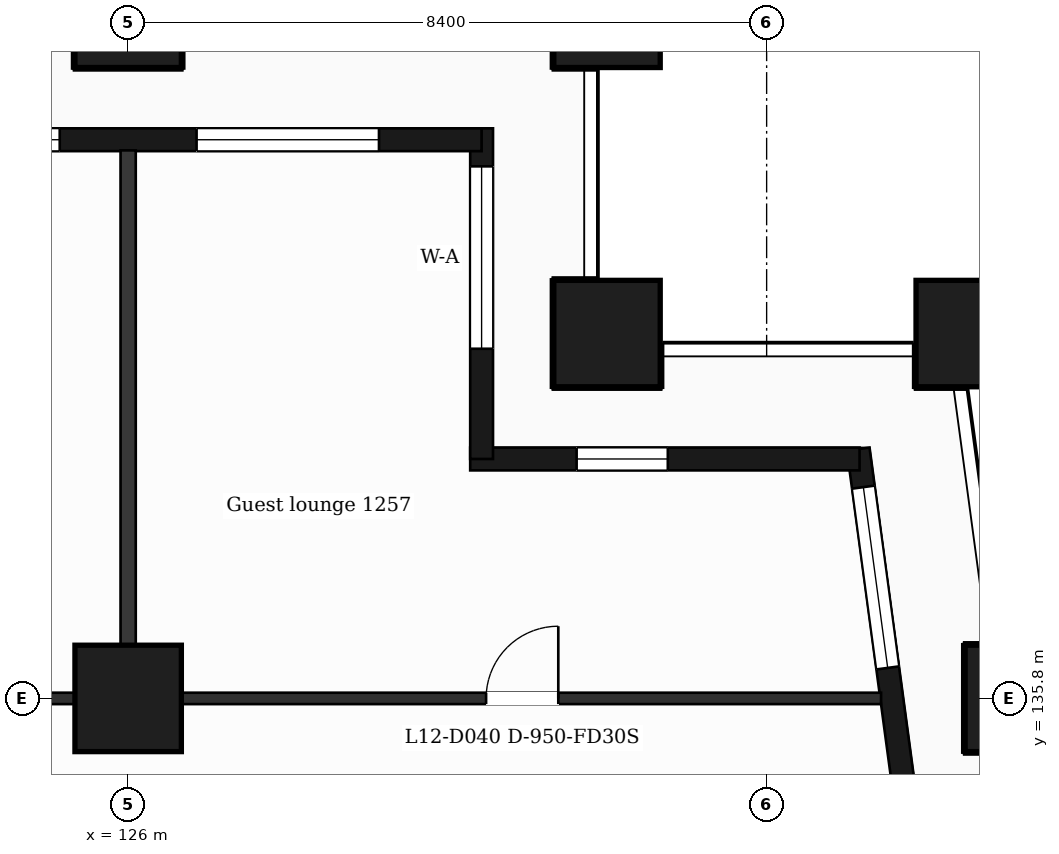
"""IFC4 building model, lengths in metres.
Left out: names, types, materials, properties, quantities, classifications, styles, units other than length and angle.
Written with IfcOpenShell. Run it as: python <this file> out.ifc"""

import sys

from ifc_helpers import new_model, si_unit, direction, frame, frame_2d, origin, origin_2d, place, context, subcontext, project, spatial, rectangle, extrude, element, fill, save


model = new_model("IFC4")
c1 = context("Model", 3, precision=1e-05, world=origin(), true_north=direction((0.0, 1.0)))
c2 = subcontext(c1, "Body", "Model", "MODEL_VIEW")
j1 = project(units=[si_unit("LENGTHUNIT", "METRE"), si_unit("PLANEANGLEUNIT", "RADIAN")], contexts=[c1])
p1 = place(None, origin())
s1 = spatial("IfcSite", under=j1, at=p1, CompositionType="ELEMENT")
p2 = place(p1, origin())
s2 = spatial("IfcBuilding", under=s1, at=p2, CompositionType="ELEMENT")
p3 = place(p2, frame((0.0, 0.0, 60.0)))
s3 = spatial("IfcBuildingStorey", under=s2, at=p3, CompositionType="ELEMENT", Elevation=60.0)
for number, where, z_axis, x_axis in (
    (1, (132.3, 140.6, 0.0), (0.0, 0.0, 1.0), (1.0, 0.0, 0.0)),
    (2, (137.065, 140.6, 0.0), (0.0, 0.0, 1.0), (1.0, 0.0, 0.0)),
    (3, (126.0, 135.8, 0.0), (0.0, 0.0, 1.0), (1.0, 0.0, 0.0)),
    (4, (137.711, 135.8, 0.0), (0.0, 0.0, 1.0), (1.0, 0.0, 0.0)),
    (5, (126.0, 144.8, 0.0), (0.0, 0.0, 1.0), (1.0, 0.0, 0.0)),
    (6, (132.3, 144.8, 0.0), (0.0, 0.0, 1.0), (1.0, 0.0, 0.0)),
):
    element("IfcColumn", number, at=place(p3, frame(where, z_axis=z_axis, x_axis=x_axis)), inside=s3, PredefinedType="COLUMN", context=c2, shape_type="SweptSolid", body=[
        extrude(rectangle(XDim=1.4, YDim=1.4, at=origin_2d()), origin(), (0.0, 0.0, 1.0), 3.5),
    ])
p4 = place(p3, frame((136.504, 132.4, 0.0), z_axis=(0.0, 0.0, 1.0), x_axis=(-0.133399697462, 0.99106231929, 0.0)))
e7 = element("IfcWall", 7, at=p4, inside=s3, PredefinedType="SOLIDWALL", context=c2, shape_type="SweptSolid", body=[
    extrude(rectangle(XDim=6.74, YDim=0.3, at=frame_2d((3.37, 0.0))), origin(), (0.0, 0.0, 1.0), 3.18),
])
p5 = place(p4, frame((1.115, 0.0, 0.0)))
e8 = element("IfcOpeningElement", 8, at=p5, cuts=e7, PredefinedType="OPENING", context=c2, shape_type="SweptSolid", body=[
    extrude(rectangle(XDim=1.2, YDim=2.4, at=frame_2d((0.6, 1.2))), frame((0.0, 0.16, 0.0), z_axis=(0.0, -1.0, 0.0), x_axis=(1.0, 0.0, 0.0)), (0.0, 0.0, 1.0), 0.32),
])
p6 = place(p4, frame((3.835, 0.0, 0.9)))
e9 = element("IfcOpeningElement", 9, at=p6, cuts=e7, PredefinedType="OPENING", context=c2, shape_type="SweptSolid", body=[
    extrude(rectangle(XDim=2.4, YDim=2.1, at=frame_2d((1.2, 1.05))), frame((0.0, 0.16, 0.0), z_axis=(0.0, -1.0, 0.0), x_axis=(1.0, 0.0, 0.0)), (0.0, 0.0, 1.0), 0.32),
])
p7 = place(p3, frame((135.623, 138.95, 0.0), z_axis=(0.0, 0.0, 1.0), x_axis=(-1.0, 0.0, 0.0)))
e10 = element("IfcWall", 10, at=p7, inside=s3, PredefinedType="SOLIDWALL", context=c2, shape_type="SweptSolid", body=[
    extrude(rectangle(XDim=5.123, YDim=0.3, at=frame_2d((2.561, 0.0))), origin(), (0.0, 0.0, 1.0), 3.18),
])
p8 = place(p7, frame((2.523, 0.0, 0.9)))
e11 = element("IfcOpeningElement", 11, at=p8, cuts=e10, PredefinedType="OPENING", context=c2, shape_type="SweptSolid", body=[
    extrude(rectangle(XDim=1.2, YDim=2.1, at=frame_2d((0.6, 1.05))), frame((0.0, 0.16, 0.0), z_axis=(0.0, -1.0, 0.0), x_axis=(1.0, 0.0, 0.0)), (0.0, 0.0, 1.0), 0.32),
])
p9 = place(p3, frame((130.65, 138.95, 0.0), z_axis=(0.0, 0.0, 1.0), x_axis=(0.0, 1.0, 0.0)))
e12 = element("IfcWall", 12, at=p9, inside=s3, PredefinedType="SOLIDWALL", context=c2, shape_type="SweptSolid", body=[
    extrude(rectangle(XDim=4.35, YDim=0.3, at=frame_2d((2.175, 0.0))), origin(), (0.0, 0.0, 1.0), 3.18),
])
p10 = place(p9, frame((1.45, 0.0, 0.9)))
e13 = element("IfcOpeningElement", 13, at=p10, cuts=e12, PredefinedType="OPENING", context=c2, shape_type="SweptSolid", body=[
    extrude(rectangle(XDim=2.4, YDim=2.1, at=frame_2d((1.2, 1.05))), frame((0.0, 0.16, 0.0), z_axis=(0.0, -1.0, 0.0), x_axis=(1.0, 0.0, 0.0)), (0.0, 0.0, 1.0), 0.32),
])
p11 = place(p3, frame((130.65, 143.15, 0.0), z_axis=(0.0, 0.0, 1.0), x_axis=(-1.0, 0.0, 0.0)))
e14 = element("IfcWall", 14, at=p11, inside=s3, PredefinedType="SOLIDWALL", context=c2, shape_type="SweptSolid", body=[
    extrude(rectangle(XDim=16.35, YDim=0.3, at=frame_2d((8.175, 0.0))), origin(), (0.0, 0.0, 1.0), 3.18),
])
p12 = place(p11, frame((1.35, 0.0, 0.9)))
e15 = element("IfcOpeningElement", 15, at=p12, cuts=e14, PredefinedType="OPENING", context=c2, shape_type="SweptSolid", body=[
    extrude(rectangle(XDim=2.4, YDim=2.1, at=frame_2d((1.2, 1.05))), frame((0.0, 0.16, 0.0), z_axis=(0.0, -1.0, 0.0), x_axis=(1.0, 0.0, 0.0)), (0.0, 0.0, 1.0), 0.32),
])
p13 = place(p11, frame((5.55, 0.0, 0.9)))
e16 = element("IfcOpeningElement", 16, at=p13, cuts=e14, PredefinedType="OPENING", context=c2, shape_type="SweptSolid", body=[
    extrude(rectangle(XDim=2.4, YDim=2.1, at=frame_2d((1.2, 1.05))), frame((0.0, 0.16, 0.0), z_axis=(0.0, -1.0, 0.0), x_axis=(1.0, 0.0, 0.0)), (0.0, 0.0, 1.0), 0.32),
])
p14 = place(p11, frame((9.45, 0.0, 0.0)))
e17 = element("IfcOpeningElement", 17, at=p14, cuts=e14, PredefinedType="OPENING", context=c2, shape_type="SweptSolid", body=[
    extrude(rectangle(XDim=1.2, YDim=2.4, at=frame_2d((0.6, 1.2))), frame((0.0, 0.16, 0.0), z_axis=(0.0, -1.0, 0.0), x_axis=(1.0, 0.0, 0.0)), (0.0, 0.0, 1.0), 0.32),
])
p15 = place(p11, frame((11.25, 0.0, 0.9)))
e18 = element("IfcOpeningElement", 18, at=p15, cuts=e14, PredefinedType="OPENING", context=c2, shape_type="SweptSolid", body=[
    extrude(rectangle(XDim=1.2, YDim=2.1, at=frame_2d((0.6, 1.05))), frame((0.0, 0.16, 0.0), z_axis=(0.0, -1.0, 0.0), x_axis=(1.0, 0.0, 0.0)), (0.0, 0.0, 1.0), 0.32),
])
p16 = place(p11, frame((13.45, 0.0, 0.9)))
e19 = element("IfcOpeningElement", 19, at=p16, cuts=e14, PredefinedType="OPENING", context=c2, shape_type="SweptSolid", body=[
    extrude(rectangle(XDim=2.4, YDim=2.1, at=frame_2d((1.2, 1.05))), frame((0.0, 0.16, 0.0), z_axis=(0.0, -1.0, 0.0), x_axis=(1.0, 0.0, 0.0)), (0.0, 0.0, 1.0), 0.32),
])
p17 = place(p3, frame((90.895, 135.8, 0.0), z_axis=(0.0, 0.0, 1.0), x_axis=(1.0, 0.0, 0.0)))
e20 = element("IfcWall", 20, at=p17, inside=s3, PredefinedType="PARTITIONING", context=c2, shape_type="SweptSolid", body=[
    extrude(rectangle(XDim=45.011, YDim=0.15, at=frame_2d((22.505, 0.0))), origin(), (0.0, 0.0, 1.0), 3.18),
])
p18 = place(p17, frame((7.675, 0.0, 0.0)))
e21 = element("IfcOpeningElement", 21, at=p18, cuts=e20, PredefinedType="OPENING", context=c2, shape_type="SweptSolid", body=[
    extrude(rectangle(XDim=1.0, YDim=2.1, at=frame_2d((0.5, 1.05))), frame((0.0, 0.085, 0.0), z_axis=(0.0, -1.0, 0.0), x_axis=(1.0, 0.0, 0.0)), (0.0, 0.0, 1.0), 0.17),
])
p19 = place(p17, frame((10.892, 0.0, 0.0)))
e22 = element("IfcOpeningElement", 22, at=p19, cuts=e20, PredefinedType="OPENING", context=c2, shape_type="SweptSolid", body=[
    extrude(rectangle(XDim=0.95, YDim=2.1, at=frame_2d((0.475, 1.05))), frame((0.0, 0.085, 0.0), z_axis=(0.0, -1.0, 0.0), x_axis=(1.0, 0.0, 0.0)), (0.0, 0.0, 1.0), 0.17),
])
p20 = place(p17, frame((16.442, 0.0, 0.0)))
e23 = element("IfcOpeningElement", 23, at=p20, cuts=e20, PredefinedType="OPENING", context=c2, shape_type="SweptSolid", body=[
    extrude(rectangle(XDim=0.95, YDim=2.1, at=frame_2d((0.475, 1.05))), frame((0.0, 0.085, 0.0), z_axis=(0.0, -1.0, 0.0), x_axis=(1.0, 0.0, 0.0)), (0.0, 0.0, 1.0), 0.17),
])
p21 = place(p17, frame((22.368, 0.0, 0.0)))
e24 = element("IfcOpeningElement", 24, at=p21, cuts=e20, PredefinedType="OPENING", context=c2, shape_type="SweptSolid", body=[
    extrude(rectangle(XDim=0.95, YDim=2.1, at=frame_2d((0.475, 1.05))), frame((0.0, 0.085, 0.0), z_axis=(0.0, -1.0, 0.0), x_axis=(1.0, 0.0, 0.0)), (0.0, 0.0, 1.0), 0.17),
])
p22 = place(p17, frame((31.825, 0.0, 0.0)))
e25 = element("IfcOpeningElement", 25, at=p22, cuts=e20, PredefinedType="OPENING", context=c2, shape_type="SweptSolid", body=[
    extrude(rectangle(XDim=0.95, YDim=2.1, at=frame_2d((0.475, 1.05))), frame((0.0, 0.085, 0.0), z_axis=(0.0, -1.0, 0.0), x_axis=(1.0, 0.0, 0.0)), (0.0, 0.0, 1.0), 0.17),
])
p23 = place(p17, frame((39.814, 0.0, 0.0)))
e26 = element("IfcOpeningElement", 26, at=p23, cuts=e20, PredefinedType="OPENING", context=c2, shape_type="SweptSolid", body=[
    extrude(rectangle(XDim=0.95, YDim=2.1, at=frame_2d((0.475, 1.05))), frame((0.0, 0.085, 0.0), z_axis=(0.0, -1.0, 0.0), x_axis=(1.0, 0.0, 0.0)), (0.0, 0.0, 1.0), 0.17),
])
p24 = place(p3, frame((126.0, 135.875, 0.0), z_axis=(0.0, 0.0, 1.0), x_axis=(0.0, 1.0, 0.0)))
e27 = element("IfcWall", 27, at=p24, inside=s3, PredefinedType="PARTITIONING", context=c2, shape_type="SweptSolid", body=[
    extrude(rectangle(XDim=7.135, YDim=0.2, at=frame_2d((3.567, 0.0))), origin(), (0.0, 0.0, 1.0), 3.18),
])
p25 = place(p6, origin())
e28 = element("IfcWindow", 28, at=p25, inside=s3, PartitioningType="SINGLE_PANEL", PredefinedType="WINDOW", context=c2, shape_type="SweptSolid", body=[
    extrude(rectangle(XDim=2.4, YDim=2.1, at=frame_2d((1.2, 1.05))), frame((0.0, 0.03, 0.0), z_axis=(0.0, -1.0, 0.0), x_axis=(1.0, 0.0, 0.0)), (0.0, 0.0, 1.0), 0.06),
])
fill(e9, e28)
p26 = place(p8, origin())
e29 = element("IfcWindow", 29, at=p26, inside=s3, PartitioningType="SINGLE_PANEL", PredefinedType="WINDOW", context=c2, shape_type="SweptSolid", body=[
    extrude(rectangle(XDim=1.2, YDim=2.1, at=frame_2d((0.6, 1.05))), frame((0.0, 0.03, 0.0), z_axis=(0.0, -1.0, 0.0), x_axis=(1.0, 0.0, 0.0)), (0.0, 0.0, 1.0), 0.06),
])
fill(e11, e29)
p27 = place(p10, origin())
e30 = element("IfcWindow", 30, at=p27, inside=s3, PartitioningType="SINGLE_PANEL", PredefinedType="WINDOW", context=c2, shape_type="SweptSolid", body=[
    extrude(rectangle(XDim=2.4, YDim=2.1, at=frame_2d((1.2, 1.05))), frame((0.0, 0.03, 0.0), z_axis=(0.0, -1.0, 0.0), x_axis=(1.0, 0.0, 0.0)), (0.0, 0.0, 1.0), 0.06),
])
fill(e13, e30)
p28 = place(p12, origin())
e31 = element("IfcWindow", 31, at=p28, inside=s3, PartitioningType="SINGLE_PANEL", PredefinedType="WINDOW", context=c2, shape_type="SweptSolid", body=[
    extrude(rectangle(XDim=2.4, YDim=2.1, at=frame_2d((1.2, 1.05))), frame((0.0, 0.03, 0.0), z_axis=(0.0, -1.0, 0.0), x_axis=(1.0, 0.0, 0.0)), (0.0, 0.0, 1.0), 0.06),
])
fill(e15, e31)
p29 = place(p13, origin())
e32 = element("IfcWindow", 32, at=p29, inside=s3, PartitioningType="SINGLE_PANEL", PredefinedType="WINDOW", context=c2, shape_type="SweptSolid", body=[
    extrude(rectangle(XDim=2.4, YDim=2.1, at=frame_2d((1.2, 1.05))), frame((0.0, 0.03, 0.0), z_axis=(0.0, -1.0, 0.0), x_axis=(1.0, 0.0, 0.0)), (0.0, 0.0, 1.0), 0.06),
])
fill(e16, e32)
p30 = place(p23, origin())
e33 = element("IfcDoor", 33, at=p30, inside=s3, OperationType="SINGLE_SWING_RIGHT", PredefinedType="DOOR", context=c2, shape_type="SweptSolid", body=[
    extrude(rectangle(XDim=0.95, YDim=2.1, at=frame_2d((0.475, 1.05))), frame((0.0, 0.025, 0.0), z_axis=(0.0, -1.0, 0.0), x_axis=(1.0, 0.0, 0.0)), (0.0, 0.0, 1.0), 0.05),
])
fill(e26, e33)
save(model, sys.argv[1])
